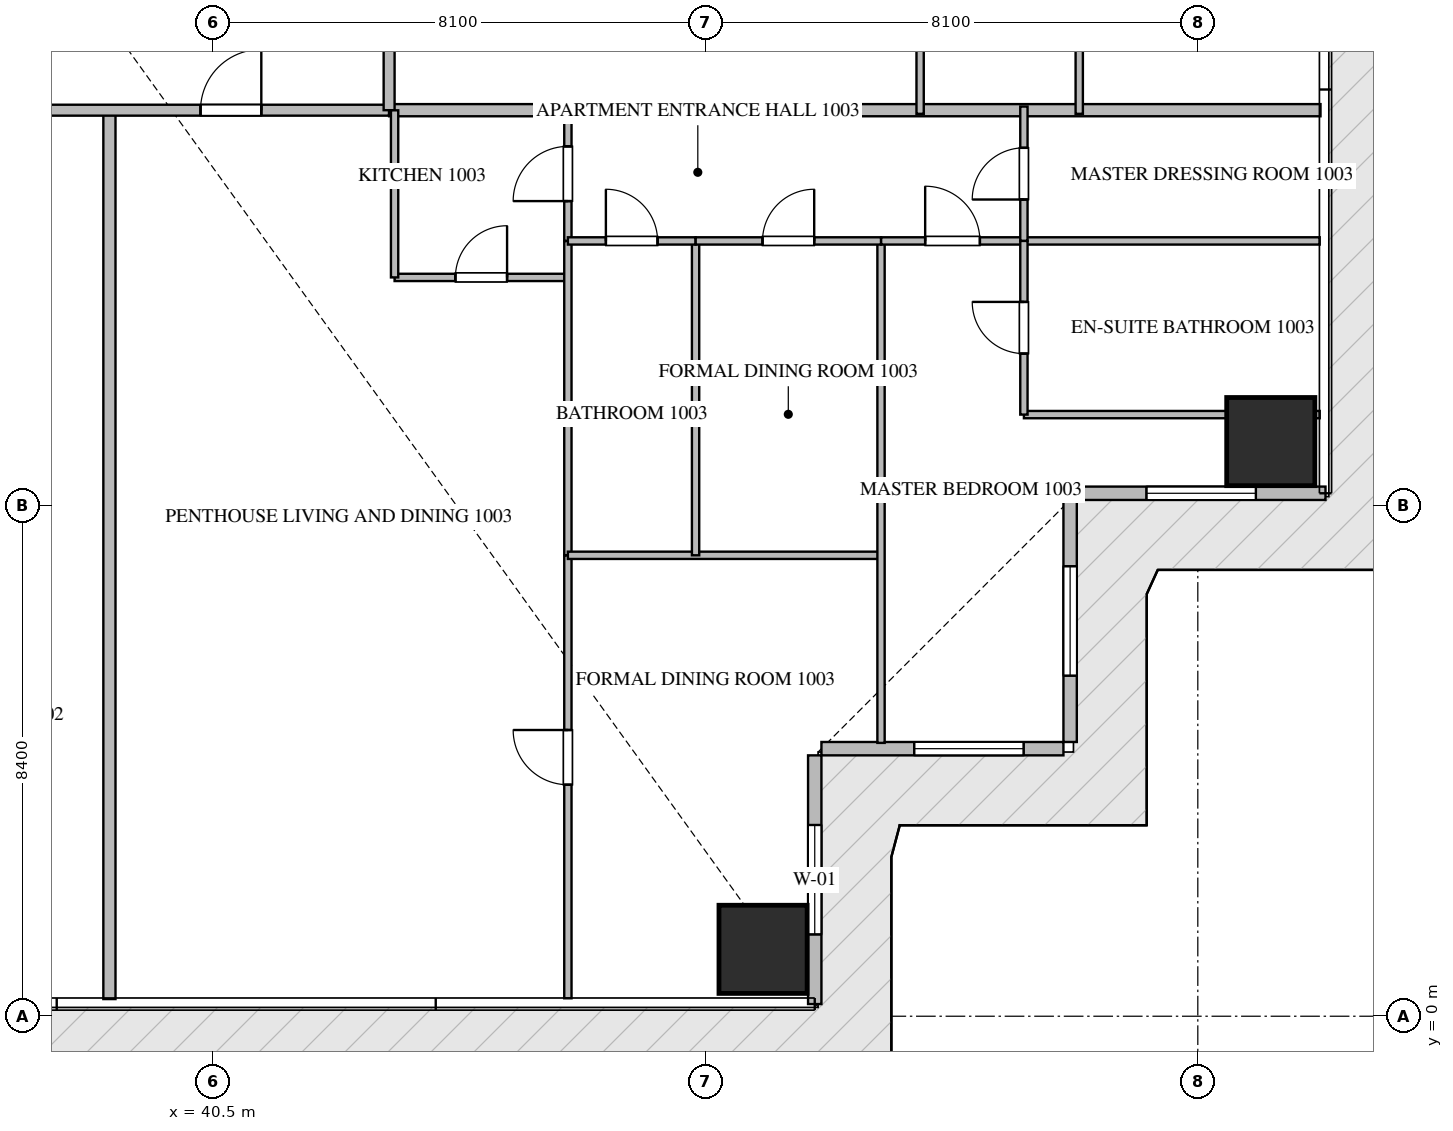
"""IFC4 building model, lengths in metres.
Left out: names, types, materials, properties, quantities, classifications, styles, units other than length and angle.
Written with IfcOpenShell. Run it as: python <this file> out.ifc"""

import sys

from ifc_helpers import new_model, si_unit, direction, frame, frame_2d, origin, origin_2d, place, context, subcontext, project, spatial, rectangle, extrude, source, transform, mapped, element, fill, save


model = new_model("IFC4")
c1 = context("Model", 3, precision=1e-05, world=origin(), true_north=direction((0.0, 1.0)))
c2 = subcontext(c1, "Body", "Model", "MODEL_VIEW")
j1 = project(units=[si_unit("LENGTHUNIT", "METRE"), si_unit("PLANEANGLEUNIT", "RADIAN")], contexts=[c1])
p1 = place(None, origin())
s1 = spatial("IfcSite", under=j1, at=p1, CompositionType="ELEMENT")
p2 = place(p1, origin())
s2 = spatial("IfcBuilding", under=s1, at=p2, CompositionType="ELEMENT")
p3 = place(p2, frame((0.0, 0.0, 45.45)))
s3 = spatial("IfcBuildingStorey", under=s2, at=p3, CompositionType="ELEMENT", Elevation=45.45)
m1 = source(origin(), c2, "Body", "SweptSolid", [
    extrude(rectangle(XDim=1.45, YDim=1.45, at=origin_2d()), origin(), (0.0, 0.0, 1.0), 3.75),
])
for number, where, z_axis, x_axis in (
    (1, (49.55, 1.1, -0.26), (0.0, 0.0, 1.0), (1.0, 0.0, 0.0)),
    (2, (57.9, 9.45, -0.26), (0.0, 0.0, 1.0), (1.0, 0.0, 0.0)),
):
    element("IfcColumn", number, at=place(p3, frame(where, z_axis=z_axis, x_axis=x_axis)), inside=s3, PredefinedType="COLUMN", context=c2, shape_type="MappedRepresentation", body=[
        mapped(m1, transform((0.0, 0.0, 0.0), scale=1.0)),
    ])
p4 = place(p3, frame((50.4, 0.2, 0.0), z_axis=(0.0, 0.0, 1.0), x_axis=(0.0, 1.0, 0.0)))
e3 = element("IfcWall", 3, at=p4, inside=s3, PredefinedType="ELEMENTEDWALL", context=c2, shape_type="SweptSolid", body=[
    extrude(rectangle(XDim=4.09, YDim=0.22, at=frame_2d((2.045, 0.0))), origin(), (0.0, 0.0, 1.0), 3.475),
])
p5 = place(p4, frame((1.145, 0.0, 0.65)))
e4 = element("IfcOpeningElement", 4, at=p5, cuts=e3, PredefinedType="OPENING", context=c2, shape_type="SweptSolid", body=[
    extrude(rectangle(XDim=1.8, YDim=2.1, at=frame_2d((0.9, 1.05))), frame((0.0, 0.12, 0.0), z_axis=(0.0, -1.0, 0.0), x_axis=(1.0, 0.0, 0.0)), (0.0, 0.0, 1.0), 0.24),
])
p6 = place(p3, frame((50.51, 4.4, 0.0), z_axis=(0.0, 0.0, 1.0), x_axis=(1.0, 0.0, 0.0)))
e5 = element("IfcWall", 5, at=p6, inside=s3, PredefinedType="ELEMENTEDWALL", context=c2, shape_type="SweptSolid", body=[
    extrude(rectangle(XDim=3.98, YDim=0.22, at=frame_2d((1.99, 0.0))), origin(), (0.0, 0.0, 1.0), 3.475),
])
p7 = place(p6, frame((1.526, 0.0, 0.65)))
e6 = element("IfcOpeningElement", 6, at=p7, cuts=e5, PredefinedType="OPENING", context=c2, shape_type="SweptSolid", body=[
    extrude(rectangle(XDim=1.8, YDim=2.1, at=frame_2d((0.9, 1.05))), frame((0.0, 0.12, 0.0), z_axis=(0.0, -1.0, 0.0), x_axis=(1.0, 0.0, 0.0)), (0.0, 0.0, 1.0), 0.24),
])
p8 = place(p3, frame((54.6, 4.51, 0.0), z_axis=(0.0, 0.0, 1.0), x_axis=(0.0, 1.0, 0.0)))
e7 = element("IfcWall", 7, at=p8, inside=s3, PredefinedType="ELEMENTEDWALL", context=c2, shape_type="SweptSolid", body=[
    extrude(rectangle(XDim=3.98, YDim=0.22, at=frame_2d((1.99, 0.0))), origin(), (0.0, 0.0, 1.0), 3.475),
])
p9 = place(p8, frame((1.09, 0.0, 0.65)))
e8 = element("IfcOpeningElement", 8, at=p9, cuts=e7, PredefinedType="OPENING", context=c2, shape_type="SweptSolid", body=[
    extrude(rectangle(XDim=1.8, YDim=2.1, at=frame_2d((0.9, 1.05))), frame((0.0, 0.12, 0.0), z_axis=(0.0, -1.0, 0.0), x_axis=(1.0, 0.0, 0.0)), (0.0, 0.0, 1.0), 0.24),
])
p10 = place(p3, frame((54.71, 8.6, 0.0), z_axis=(0.0, 0.0, 1.0), x_axis=(1.0, 0.0, 0.0)))
e9 = element("IfcWall", 9, at=p10, inside=s3, PredefinedType="ELEMENTEDWALL", context=c2, shape_type="SweptSolid", body=[
    extrude(rectangle(XDim=4.09, YDim=0.22, at=frame_2d((2.045, 0.0))), origin(), (0.0, 0.0, 1.0), 3.475),
])
p11 = place(p10, frame((1.145, 0.0, 0.65)))
e10 = element("IfcOpeningElement", 10, at=p11, cuts=e9, PredefinedType="OPENING", context=c2, shape_type="SweptSolid", body=[
    extrude(rectangle(XDim=1.8, YDim=2.1, at=frame_2d((0.9, 1.05))), frame((0.0, 0.12, 0.0), z_axis=(0.0, -1.0, 0.0), x_axis=(1.0, 0.0, 0.0)), (0.0, 0.0, 1.0), 0.24),
])
p12 = place(p3, frame((38.8, 0.282, 0.0), z_axis=(0.0, 0.0, 1.0), x_axis=(0.0, 1.0, 0.0)))
e11 = element("IfcWall", 11, at=p12, inside=s3, PredefinedType="PARTITIONING", context=c2, shape_type="SweptSolid", body=[
    extrude(rectangle(XDim=14.618, YDim=0.2, at=frame_2d((7.309, 0.0))), origin(), (0.0, 0.0, 1.0), 3.49),
])
p13 = place(p3, frame((43.4, 14.9, 0.0), z_axis=(0.0, 0.0, 1.0), x_axis=(1.0, 0.0, 0.0)))
e12 = element("IfcWall", 12, at=p13, inside=s3, PredefinedType="PARTITIONING", context=c2, shape_type="SweptSolid", body=[
    extrude(rectangle(XDim=15.318, YDim=0.2, at=frame_2d((7.659, 0.0))), origin(), (0.0, 0.0, 1.0), 3.49),
])
p14 = place(p3, frame((21.402, 14.9, 0.0), z_axis=(0.0, 0.0, 1.0), x_axis=(1.0, 0.0, 0.0)))
e13 = element("IfcWall", 13, at=p14, inside=s3, PredefinedType="PARTITIONING", context=c2, shape_type="SweptSolid", body=[
    extrude(rectangle(XDim=21.996, YDim=0.18, at=frame_2d((10.998, 0.0))), origin(), (0.0, 0.0, 1.0), 3.49),
])
p15 = place(p14, frame((2.1, 0.0, 0.0)))
e14 = element("IfcOpeningElement", 14, at=p15, cuts=e13, PredefinedType="OPENING", context=c2, shape_type="SweptSolid", body=[
    extrude(rectangle(XDim=1.0, YDim=2.15, at=frame_2d((0.5, 1.075))), frame((0.0, 0.1, 0.0), z_axis=(0.0, -1.0, 0.0), x_axis=(1.0, 0.0, 0.0)), (0.0, 0.0, 1.0), 0.2),
])
p16 = place(p14, frame((14.319, 0.0, 0.0)))
e15 = element("IfcOpeningElement", 15, at=p16, cuts=e13, PredefinedType="OPENING", context=c2, shape_type="SweptSolid", body=[
    extrude(rectangle(XDim=1.0, YDim=2.15, at=frame_2d((0.5, 1.075))), frame((0.0, 0.1, 0.0), z_axis=(0.0, -1.0, 0.0), x_axis=(1.0, 0.0, 0.0)), (0.0, 0.0, 1.0), 0.2),
])
p17 = place(p14, frame((18.896, 0.0, 0.0)))
e16 = element("IfcOpeningElement", 16, at=p17, cuts=e13, PredefinedType="OPENING", context=c2, shape_type="SweptSolid", body=[
    extrude(rectangle(XDim=1.0, YDim=2.15, at=frame_2d((0.5, 1.075))), frame((0.0, 0.1, 0.0), z_axis=(0.0, -1.0, 0.0), x_axis=(1.0, 0.0, 0.0)), (0.0, 0.0, 1.0), 0.2),
])
p18 = place(p3, frame((43.4, 14.9, 0.0), z_axis=(0.0, 0.0, 1.0), x_axis=(0.0, 1.0, 0.0)))
e17 = element("IfcWall", 17, at=p18, inside=s3, PredefinedType="PARTITIONING", context=c2, shape_type="SweptSolid", body=[
    extrude(rectangle(XDim=20.6, YDim=0.18, at=frame_2d((10.3, 0.0))), origin(), (0.0, 0.0, 1.0), 3.49),
])
p19 = place(p18, frame((17.64, 0.0, 0.0)))
e18 = element("IfcOpeningElement", 18, at=p19, cuts=e17, PredefinedType="OPENING", context=c2, shape_type="SweptSolid", body=[
    extrude(rectangle(XDim=1.0, YDim=2.15, at=frame_2d((0.5, 1.075))), frame((0.0, 0.1, 0.0), z_axis=(0.0, -1.0, 0.0), x_axis=(1.0, 0.0, 0.0)), (0.0, 0.0, 1.0), 0.2),
])
p20 = place(p3, frame((43.49, 12.15, 0.0), z_axis=(0.0, 0.0, 1.0), x_axis=(1.0, 0.0, 0.0)))
e19 = element("IfcWall", 19, at=p20, inside=s3, PredefinedType="PARTITIONING", context=c2, shape_type="SweptSolid", body=[
    extrude(rectangle(XDim=2.85, YDim=0.12, at=frame_2d((1.425, 0.0))), origin(), (0.0, 0.0, 1.0), 3.49),
])
p21 = place(p20, frame((1.0, 0.0, 0.0)))
e20 = element("IfcOpeningElement", 20, at=p21, cuts=e19, PredefinedType="OPENING", context=c2, shape_type="SweptSolid", body=[
    extrude(rectangle(XDim=0.85, YDim=2.1, at=frame_2d((0.425, 1.05))), frame((0.0, 0.07, 0.0), z_axis=(0.0, -1.0, 0.0), x_axis=(1.0, 0.0, 0.0)), (0.0, 0.0, 1.0), 0.14),
])
p22 = place(p3, frame((43.49, 12.15, 0.0), z_axis=(0.0, 0.0, 1.0), x_axis=(0.0, 1.0, 0.0)))
e21 = element("IfcWall", 21, at=p22, inside=s3, PredefinedType="PARTITIONING", context=c2, shape_type="SweptSolid", body=[
    extrude(rectangle(XDim=2.748, YDim=0.12, at=frame_2d((1.374, 0.0))), origin(), (0.0, 0.0, 1.0), 3.49),
])
p23 = place(p3, frame((46.34, 12.75, 0.0), z_axis=(0.0, 0.0, 1.0), x_axis=(0.0, 1.0, 0.0)))
e22 = element("IfcWall", 22, at=p23, inside=s3, PredefinedType="PARTITIONING", context=c2, shape_type="SweptSolid", body=[
    extrude(rectangle(XDim=2.21, YDim=0.12, at=frame_2d((1.105, 0.0))), origin(), (0.0, 0.0, 1.0), 3.49),
])
p24 = place(p23, frame((0.655, 0.0, 0.0)))
e23 = element("IfcOpeningElement", 23, at=p24, cuts=e22, PredefinedType="OPENING", context=c2, shape_type="SweptSolid", body=[
    extrude(rectangle(XDim=0.9, YDim=2.1, at=frame_2d((0.45, 1.05))), frame((0.0, 0.07, 0.0), z_axis=(0.0, -1.0, 0.0), x_axis=(1.0, 0.0, 0.0)), (0.0, 0.0, 1.0), 0.14),
])
p25 = place(p3, frame((46.34, 0.295, 0.0), z_axis=(0.0, 0.0, 1.0), x_axis=(0.0, 1.0, 0.0)))
e24 = element("IfcWall", 24, at=p25, inside=s3, PredefinedType="PARTITIONING", context=c2, shape_type="SweptSolid", body=[
    extrude(rectangle(XDim=7.285, YDim=0.12, at=frame_2d((3.643, 0.0))), origin(), (0.0, 0.0, 1.0), 3.49),
])
p26 = place(p25, frame((3.512, 0.0, 0.0)))
e25 = element("IfcOpeningElement", 25, at=p26, cuts=e24, PredefinedType="OPENING", context=c2, shape_type="SweptSolid", body=[
    extrude(rectangle(XDim=0.9, YDim=2.1, at=frame_2d((0.45, 1.05))), frame((0.0, 0.07, 0.0), z_axis=(0.0, -1.0, 0.0), x_axis=(1.0, 0.0, 0.0)), (0.0, 0.0, 1.0), 0.14),
])
p27 = place(p3, frame((46.34, 7.582, 0.0), z_axis=(0.0, 0.0, 1.0), x_axis=(0.0, 1.0, 0.0)))
e26 = element("IfcWall", 26, at=p27, inside=s3, PredefinedType="PARTITIONING", context=c2, shape_type="SweptSolid", body=[
    extrude(rectangle(XDim=5.166, YDim=0.12, at=frame_2d((2.583, 0.0))), origin(), (0.0, 0.0, 1.0), 3.49),
])
p28 = place(p3, frame((46.34, 7.58, 0.0), z_axis=(0.0, 0.0, 1.0), x_axis=(1.0, 0.0, 0.0)))
e27 = element("IfcWall", 27, at=p28, inside=s3, PredefinedType="PARTITIONING", context=c2, shape_type="SweptSolid", body=[
    extrude(rectangle(XDim=5.15, YDim=0.12, at=frame_2d((2.575, 0.0))), origin(), (0.0, 0.0, 1.0), 3.49),
])
p29 = place(p3, frame((51.49, 4.495, 0.0), z_axis=(0.0, 0.0, 1.0), x_axis=(0.0, 1.0, 0.0)))
e28 = element("IfcWall", 28, at=p29, inside=s3, PredefinedType="PARTITIONING", context=c2, shape_type="SweptSolid", body=[
    extrude(rectangle(XDim=8.255, YDim=0.12, at=frame_2d((4.127, 0.0))), origin(), (0.0, 0.0, 1.0), 3.49),
])
p30 = place(p3, frame((48.44, 7.58, 0.0), z_axis=(0.0, 0.0, 1.0), x_axis=(0.0, 1.0, 0.0)))
e29 = element("IfcWall", 29, at=p30, inside=s3, PredefinedType="PARTITIONING", context=c2, shape_type="SweptSolid", body=[
    extrude(rectangle(XDim=5.17, YDim=0.12, at=frame_2d((2.585, 0.0))), origin(), (0.0, 0.0, 1.0), 3.49),
])
p31 = place(p3, frame((46.34, 12.75, 0.0), z_axis=(0.0, 0.0, 1.0), x_axis=(1.0, 0.0, 0.0)))
e30 = element("IfcWall", 30, at=p31, inside=s3, PredefinedType="PARTITIONING", context=c2, shape_type="SweptSolid", body=[
    extrude(rectangle(XDim=2.1, YDim=0.12, at=frame_2d((1.05, 0.0))), origin(), (0.0, 0.0, 1.0), 3.49),
])
p32 = place(p31, frame((0.625, 0.0, 0.0)))
e31 = element("IfcOpeningElement", 31, at=p32, cuts=e30, PredefinedType="OPENING", context=c2, shape_type="SweptSolid", body=[
    extrude(rectangle(XDim=0.85, YDim=2.1, at=frame_2d((0.425, 1.05))), frame((0.0, 0.07, 0.0), z_axis=(0.0, -1.0, 0.0), x_axis=(1.0, 0.0, 0.0)), (0.0, 0.0, 1.0), 0.14),
])
p33 = place(p3, frame((48.442, 12.75, 0.0), z_axis=(0.0, 0.0, 1.0), x_axis=(1.0, 0.0, 0.0)))
e32 = element("IfcWall", 32, at=p33, inside=s3, PredefinedType="PARTITIONING", context=c2, shape_type="SweptSolid", body=[
    extrude(rectangle(XDim=3.048, YDim=0.12, at=frame_2d((1.524, 0.0))), origin(), (0.0, 0.0, 1.0), 3.49),
])
p34 = place(p33, frame((1.099, 0.0, 0.0)))
e33 = element("IfcOpeningElement", 33, at=p34, cuts=e32, PredefinedType="OPENING", context=c2, shape_type="SweptSolid", body=[
    extrude(rectangle(XDim=0.85, YDim=2.1, at=frame_2d((0.425, 1.05))), frame((0.0, 0.07, 0.0), z_axis=(0.0, -1.0, 0.0), x_axis=(1.0, 0.0, 0.0)), (0.0, 0.0, 1.0), 0.14),
])
p35 = place(p3, frame((51.492, 12.75, 0.0), z_axis=(0.0, 0.0, 1.0), x_axis=(1.0, 0.0, 0.0)))
e34 = element("IfcWall", 34, at=p35, inside=s3, PredefinedType="PARTITIONING", context=c2, shape_type="SweptSolid", body=[
    extrude(rectangle(XDim=2.348, YDim=0.12, at=frame_2d((1.174, 0.0))), origin(), (0.0, 0.0, 1.0), 3.49),
])
p36 = place(p35, frame((0.724, 0.0, 0.0)))
e35 = element("IfcOpeningElement", 35, at=p36, cuts=e34, PredefinedType="OPENING", context=c2, shape_type="SweptSolid", body=[
    extrude(rectangle(XDim=0.9, YDim=2.1, at=frame_2d((0.45, 1.05))), frame((0.0, 0.07, 0.0), z_axis=(0.0, -1.0, 0.0), x_axis=(1.0, 0.0, 0.0)), (0.0, 0.0, 1.0), 0.14),
])
p37 = place(p3, frame((53.84, 9.894, 0.0), z_axis=(0.0, 0.0, 1.0), x_axis=(1.0, 0.0, 0.0)))
e36 = element("IfcWall", 36, at=p37, inside=s3, PredefinedType="PARTITIONING", context=c2, shape_type="SweptSolid", body=[
    extrude(rectangle(XDim=4.865, YDim=0.12, at=frame_2d((2.433, 0.0))), origin(), (0.0, 0.0, 1.0), 3.49),
])
p38 = place(p3, frame((53.842, 12.75, 0.0), z_axis=(0.0, 0.0, 1.0), x_axis=(1.0, 0.0, 0.0)))
e37 = element("IfcWall", 37, at=p38, inside=s3, PredefinedType="PARTITIONING", context=c2, shape_type="SweptSolid", body=[
    extrude(rectangle(XDim=4.863, YDim=0.12, at=frame_2d((2.432, 0.0))), origin(), (0.0, 0.0, 1.0), 3.49),
])
p39 = place(p3, frame((53.84, 9.894, 0.0), z_axis=(0.0, 0.0, 1.0), x_axis=(0.0, 1.0, 0.0)))
e38 = element("IfcWall", 38, at=p39, inside=s3, PredefinedType="PARTITIONING", context=c2, shape_type="SweptSolid", body=[
    extrude(rectangle(XDim=2.856, YDim=0.12, at=frame_2d((1.428, 0.0))), origin(), (0.0, 0.0, 1.0), 3.49),
])
p40 = place(p39, frame((1.003, 0.0, 0.0)))
e39 = element("IfcOpeningElement", 39, at=p40, cuts=e38, PredefinedType="OPENING", context=c2, shape_type="SweptSolid", body=[
    extrude(rectangle(XDim=0.85, YDim=2.1, at=frame_2d((0.425, 1.05))), frame((0.0, 0.07, 0.0), z_axis=(0.0, -1.0, 0.0), x_axis=(1.0, 0.0, 0.0)), (0.0, 0.0, 1.0), 0.14),
])
p41 = place(p3, frame((53.84, 12.752, 0.0), z_axis=(0.0, 0.0, 1.0), x_axis=(0.0, 1.0, 0.0)))
e40 = element("IfcWall", 40, at=p41, inside=s3, PredefinedType="PARTITIONING", context=c2, shape_type="SweptSolid", body=[
    extrude(rectangle(XDim=2.208, YDim=0.12, at=frame_2d((1.104, 0.0))), origin(), (0.0, 0.0, 1.0), 3.49),
])
p42 = place(p41, frame((0.679, 0.0, 0.0)))
e41 = element("IfcOpeningElement", 41, at=p42, cuts=e40, PredefinedType="OPENING", context=c2, shape_type="SweptSolid", body=[
    extrude(rectangle(XDim=0.85, YDim=2.1, at=frame_2d((0.425, 1.05))), frame((0.0, 0.07, 0.0), z_axis=(0.0, -1.0, 0.0), x_axis=(1.0, 0.0, 0.0)), (0.0, 0.0, 1.0), 0.14),
])
for number, where, z_axis, x_axis in (
    (42, (54.75, 14.84, 0.0), (0.0, 0.0, 1.0), (0.0, 1.0, 0.0)),
    (43, (52.133, 14.84, 0.0), (0.0, 0.0, 1.0), (0.0, 1.0, 0.0)),
):
    element("IfcWall", number, at=place(p3, frame(where, z_axis=z_axis, x_axis=x_axis)), inside=s3, PredefinedType="PARTITIONING", context=c2, shape_type="SweptSolid", body=[
        extrude(rectangle(XDim=5.41, YDim=0.12, at=frame_2d((2.705, 0.0))), origin(), (0.0, 0.0, 1.0), 3.49),
    ])
m2 = source(origin(), c2, "Body", "SweptSolid", [
    extrude(rectangle(XDim=1.8, YDim=2.1, at=frame_2d((0.9, 1.05))), frame((0.0, 0.03, 0.0), z_axis=(0.0, -1.0, 0.0), x_axis=(1.0, 0.0, 0.0)), (0.0, 0.0, 1.0), 0.06),
])
p43 = place(p5, origin())
e44 = element("IfcWindow", 44, at=p43, inside=s3, PartitioningType="SINGLE_PANEL", PredefinedType="WINDOW", context=c2, shape_type="MappedRepresentation", body=[
    mapped(m2, transform((0.0, 0.0, 0.0), scale=1.0)),
])
fill(e4, e44)
p44 = place(p7, origin())
e45 = element("IfcWindow", 45, at=p44, inside=s3, PartitioningType="SINGLE_PANEL", PredefinedType="WINDOW", context=c2, shape_type="MappedRepresentation", body=[
    mapped(m2, transform((0.0, 0.0, 0.0), scale=1.0)),
])
fill(e6, e45)
p45 = place(p9, origin())
e46 = element("IfcWindow", 46, at=p45, inside=s3, PartitioningType="SINGLE_PANEL", PredefinedType="WINDOW", context=c2, shape_type="MappedRepresentation", body=[
    mapped(m2, transform((0.0, 0.0, 0.0), scale=1.0)),
])
fill(e8, e46)
p46 = place(p11, origin())
e47 = element("IfcWindow", 47, at=p46, inside=s3, PartitioningType="SINGLE_PANEL", PredefinedType="WINDOW", context=c2, shape_type="MappedRepresentation", body=[
    mapped(m2, transform((0.0, 0.0, 0.0), scale=1.0)),
])
fill(e10, e47)
m3 = source(origin(), c2, "Body", "SweptSolid", [
    extrude(rectangle(XDim=1.0, YDim=2.15, at=frame_2d((0.5, 1.075))), frame((0.0, 0.025, 0.0), z_axis=(0.0, -1.0, 0.0), x_axis=(1.0, 0.0, 0.0)), (0.0, 0.0, 1.0), 0.05),
])
p47 = place(p17, origin())
e48 = element("IfcDoor", 48, at=p47, inside=s3, OperationType="SINGLE_SWING_RIGHT", PredefinedType="DOOR", context=c2, shape_type="MappedRepresentation", body=[
    mapped(m3, transform((0.0, 0.0, 0.0), scale=1.0)),
])
fill(e16, e48)
m4 = source(origin(), c2, "Body", "SweptSolid", [
    extrude(rectangle(XDim=0.85, YDim=2.1, at=frame_2d((0.425, 1.05))), frame((0.0, 0.025, 0.0), z_axis=(0.0, -1.0, 0.0), x_axis=(1.0, 0.0, 0.0)), (0.0, 0.0, 1.0), 0.05),
])
p48 = place(p21, origin())
e49 = element("IfcDoor", 49, at=p48, inside=s3, OperationType="SINGLE_SWING_RIGHT", PredefinedType="DOOR", context=c2, shape_type="MappedRepresentation", body=[
    mapped(m4, transform((0.0, 0.0, 0.0), scale=1.0)),
])
fill(e20, e49)
m5 = source(origin(), c2, "Body", "SweptSolid", [
    extrude(rectangle(XDim=0.9, YDim=2.1, at=frame_2d((0.45, 1.05))), frame((0.0, 0.025, 0.0), z_axis=(0.0, -1.0, 0.0), x_axis=(1.0, 0.0, 0.0)), (0.0, 0.0, 1.0), 0.05),
])
p49 = place(p24, origin())
e50 = element("IfcDoor", 50, at=p49, inside=s3, OperationType="SINGLE_SWING_LEFT", PredefinedType="DOOR", context=c2, shape_type="MappedRepresentation", body=[
    mapped(m5, transform((0.0, 0.0, 0.0), scale=1.0)),
])
fill(e23, e50)
p50 = place(p26, origin())
e51 = element("IfcDoor", 51, at=p50, inside=s3, OperationType="SINGLE_SWING_RIGHT", PredefinedType="DOOR", context=c2, shape_type="MappedRepresentation", body=[
    mapped(m5, transform((0.0, 0.0, 0.0), scale=1.0)),
])
fill(e25, e51)
p51 = place(p32, origin())
e52 = element("IfcDoor", 52, at=p51, inside=s3, OperationType="SINGLE_SWING_LEFT", PredefinedType="DOOR", context=c2, shape_type="MappedRepresentation", body=[
    mapped(m4, transform((0.0, 0.0, 0.0), scale=1.0)),
])
fill(e31, e52)
p52 = place(p34, origin())
e53 = element("IfcDoor", 53, at=p52, inside=s3, OperationType="SINGLE_SWING_RIGHT", PredefinedType="DOOR", context=c2, shape_type="MappedRepresentation", body=[
    mapped(m4, transform((0.0, 0.0, 0.0), scale=1.0)),
])
fill(e33, e53)
p53 = place(p36, origin())
e54 = element("IfcDoor", 54, at=p53, inside=s3, OperationType="SINGLE_SWING_LEFT", PredefinedType="DOOR", context=c2, shape_type="MappedRepresentation", body=[
    mapped(m5, transform((0.0, 0.0, 0.0), scale=1.0)),
])
fill(e35, e54)
p54 = place(p40, origin())
e55 = element("IfcDoor", 55, at=p54, inside=s3, OperationType="SINGLE_SWING_RIGHT", PredefinedType="DOOR", context=c2, shape_type="MappedRepresentation", body=[
    mapped(m4, transform((0.0, 0.0, 0.0), scale=1.0)),
])
fill(e39, e55)
p55 = place(p42, origin())
e56 = element("IfcDoor", 56, at=p55, inside=s3, OperationType="SINGLE_SWING_LEFT", PredefinedType="DOOR", context=c2, shape_type="MappedRepresentation", body=[
    mapped(m4, transform((0.0, 0.0, 0.0), scale=1.0)),
])
fill(e41, e56)
save(model, sys.argv[1])
